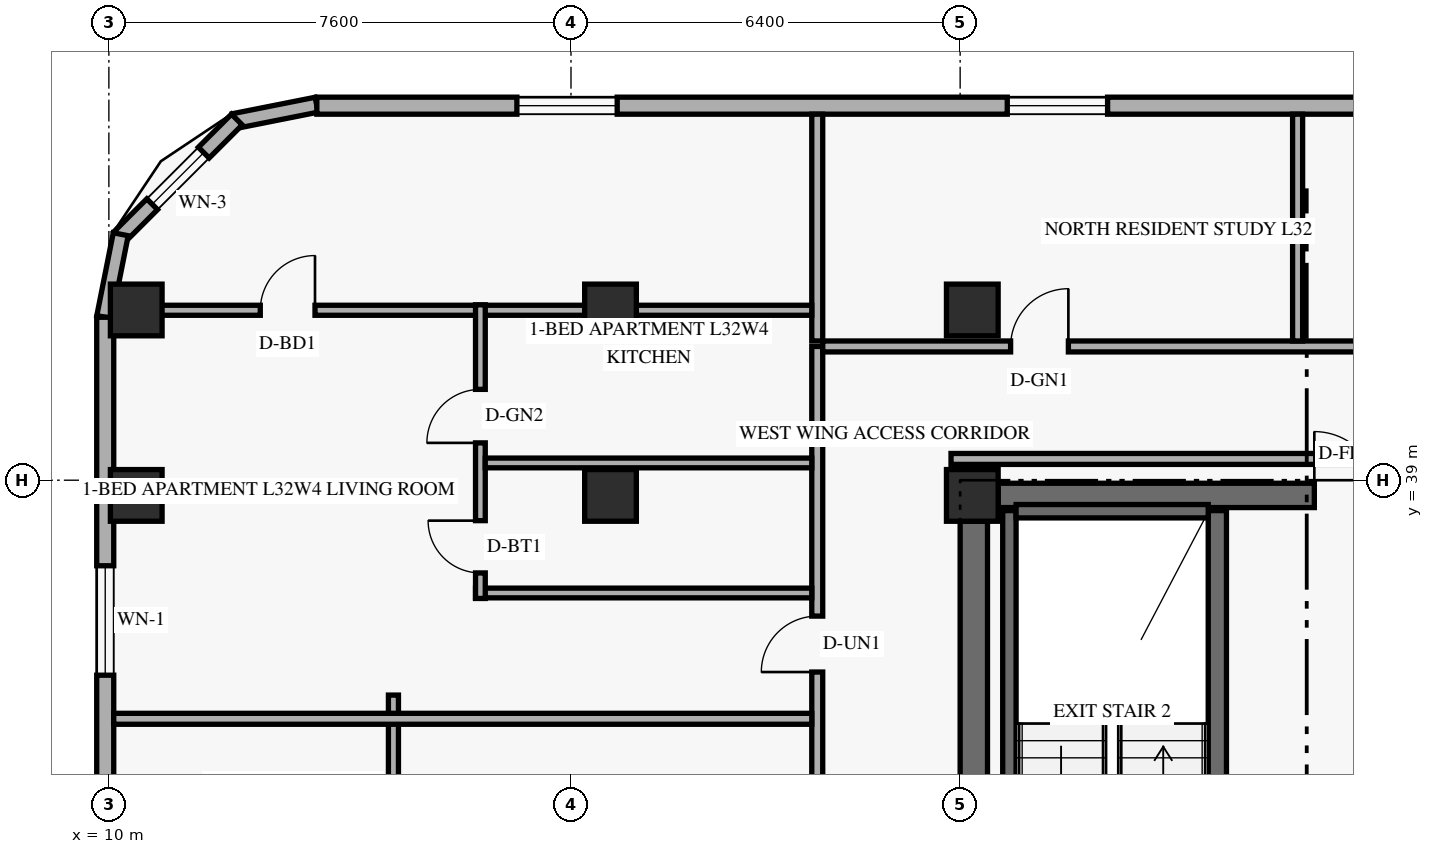
"""IFC4 building model, lengths in metres.
Left out: names, types, materials, properties, quantities, classifications, styles, units other than length and angle.
Written with IfcOpenShell. Run it as: python <this file> out.ifc"""

import sys

from ifc_helpers import new_model, si_unit, direction, frame, frame_2d, origin, origin_2d, place, context, subcontext, project, spatial, rectangle, extrude, element, fill, save


model = new_model("IFC4")
c1 = context("Model", 3, precision=1e-05, world=origin(), true_north=direction((0.0, 1.0)))
c2 = subcontext(c1, "Body", "Model", "MODEL_VIEW")
j1 = project(units=[si_unit("LENGTHUNIT", "METRE"), si_unit("PLANEANGLEUNIT", "RADIAN")], contexts=[c1])
p1 = place(None, origin())
s1 = spatial("IfcSite", under=j1, at=p1, CompositionType="ELEMENT")
p2 = place(p1, origin())
s2 = spatial("IfcBuilding", under=s1, at=p2, CompositionType="ELEMENT")
p3 = place(p2, frame((0.0, 0.0, 124.8)))
s3 = spatial("IfcBuildingStorey", under=s2, at=p3, CompositionType="ELEMENT", Elevation=124.8)
p4 = place(p3, frame((24.225, 30.625, 0.0), z_axis=(0.0, 0.0, 1.0), x_axis=(0.0, 1.0, 0.0)))
e1 = element("IfcWall", 1, at=p4, inside=s3, PredefinedType="SHEAR", context=c2, shape_type="SweptSolid", body=[
    extrude(rectangle(XDim=7.7, YDim=0.45, at=frame_2d((3.85, 0.0))), origin(), (0.0, 0.0, 1.0), 2.749),
])
p5 = place(p3, frame((24.625, 38.75, 0.0), z_axis=(0.0, 0.0, 1.0), x_axis=(1.0, 0.0, 0.0)))
e2 = element("IfcWall", 2, at=p5, inside=s3, PredefinedType="SHEAR", context=c2, shape_type="SweptSolid", body=[
    extrude(rectangle(XDim=10.15, YDim=0.4, at=frame_2d((5.075, 0.0))), origin(), (0.0, 0.0, 1.0), 3.36),
])
p6 = place(p5, frame((5.2, 0.0, 0.0)))
e3 = element("IfcOpeningElement", 3, at=p6, cuts=e2, PredefinedType="OPENING", context=c2, shape_type="SweptSolid", body=[
    extrude(rectangle(XDim=1.05, YDim=2.15, at=frame_2d((0.525, 1.075))), frame((0.0, 0.21, 0.0), z_axis=(0.0, -1.0, 0.0), x_axis=(1.0, 0.0, 0.0)), (0.0, 0.0, 1.0), 0.42),
])
p7 = place(p3, frame((24.81, 30.74, 0.0), z_axis=(0.0, 0.0, 1.0), x_axis=(0.0, 1.0, 0.0)))
e4 = element("IfcWall", 4, at=p7, inside=s3, PredefinedType="SHEAR", context=c2, shape_type="SweptSolid", body=[
    extrude(rectangle(XDim=7.76, YDim=0.22, at=frame_2d((3.88, 0.0))), origin(), (0.0, 0.0, 1.0), 3.36),
])
p8 = place(p3, frame((28.23, 30.74, 0.0), z_axis=(0.0, 0.0, 1.0), x_axis=(0.0, 1.0, 0.0)))
e5 = element("IfcWall", 5, at=p8, inside=s3, PredefinedType="SHEAR", context=c2, shape_type="SweptSolid", body=[
    extrude(rectangle(XDim=7.76, YDim=0.3, at=frame_2d((3.88, 0.0))), origin(), (0.0, 0.0, 1.0), 3.36),
])
p9 = place(p3, frame((24.92, 38.49, 0.0), z_axis=(0.0, 0.0, 1.0), x_axis=(1.0, 0.0, 0.0)))
e6 = element("IfcWall", 6, at=p9, inside=s3, PredefinedType="SHEAR", context=c2, shape_type="SweptSolid", body=[
    extrude(rectangle(XDim=3.16, YDim=0.22, at=frame_2d((1.58, 0.0))), origin(), (0.0, 0.0, 1.0), 3.36),
])
for number, where, z_axis, x_axis in (
    (7, (10.45, 38.75, 0.0), (0.0, 0.0, 1.0), (1.0, 0.0, 0.0)),
    (8, (10.45, 41.8, 0.0), (0.0, 0.0, 1.0), (1.0, 0.0, 0.0)),
    (9, (18.25, 38.75, 0.0), (0.0, 0.0, 1.0), (1.0, 0.0, 0.0)),
    (10, (18.25, 41.8, 0.0), (0.0, 0.0, 1.0), (1.0, 0.0, 0.0)),
    (11, (24.2, 38.75, 0.0), (0.0, 0.0, 1.0), (1.0, 0.0, 0.0)),
    (12, (24.2, 41.8, 0.0), (0.0, 0.0, 1.0), (1.0, 0.0, 0.0)),
):
    element("IfcColumn", number, at=place(p3, frame(where, z_axis=z_axis, x_axis=x_axis)), inside=s3, PredefinedType="COLUMN", context=c2, shape_type="SweptSolid", body=[
        extrude(rectangle(XDim=0.85, YDim=0.85, at=origin_2d()), origin(), (0.0, 0.0, 1.0), 3.6),
    ])
p10 = place(p3, frame((13.417, 45.176, 0.0), z_axis=(0.0, 0.0, 1.0), x_axis=(-0.980809899341, -0.19496651342, 0.0)))
e13 = element("IfcWall", 13, at=p10, inside=s3, PredefinedType="SOLIDWALL", context=c2, shape_type="SweptSolid", body=[
    extrude(rectangle(XDim=1.389, YDim=0.25, at=frame_2d((0.694, 0.0))), origin(), (0.0, 0.0, 1.0), 3.36),
])
p11 = place(p3, frame((12.105, 44.932, 0.0), z_axis=(0.0, 0.0, 1.0), x_axis=(-0.707151344399, -0.707062215165, 0.0)))
e14 = element("IfcWall", 14, at=p11, inside=s3, PredefinedType="SOLIDWALL", context=c2, shape_type="SweptSolid", body=[
    extrude(rectangle(XDim=2.739, YDim=0.25, at=frame_2d((1.37, 0.0))), origin(), (0.0, 0.0, 1.0), 3.36),
])
p12 = place(p11, frame((0.77, 0.0, 0.85)))
e15 = element("IfcOpeningElement", 15, at=p12, cuts=e14, PredefinedType="OPENING", context=c2, shape_type="SweptSolid", body=[
    extrude(rectangle(XDim=1.2, YDim=1.5, at=frame_2d((0.6, 0.75))), frame((0.0, 0.135, 0.0), z_axis=(0.0, -1.0, 0.0), x_axis=(1.0, 0.0, 0.0)), (0.0, 0.0, 1.0), 0.27),
])
p13 = place(p3, frame((10.195, 43.045, 0.0), z_axis=(0.0, 0.0, 1.0), x_axis=(-0.195000137217, -0.980803214965, 0.0)))
e16 = element("IfcWall", 16, at=p13, inside=s3, PredefinedType="SOLIDWALL", context=c2, shape_type="SweptSolid", body=[
    extrude(rectangle(XDim=1.388, YDim=0.25, at=frame_2d((0.694, 0.0))), origin(), (0.0, 0.0, 1.0), 3.36),
])
p14 = place(p3, frame((49.98, 45.16, 0.0), z_axis=(0.0, 0.0, 1.0), x_axis=(-1.0, 0.0, 0.0)))
e17 = element("IfcWall", 17, at=p14, inside=s3, PredefinedType="SOLIDWALL", context=c2, shape_type="SweptSolid", body=[
    extrude(rectangle(XDim=36.56, YDim=0.28, at=frame_2d((18.28, 0.0))), origin(), (0.0, 0.0, 1.0), 3.36),
])
p15 = place(p14, frame((31.62, 0.0, 0.85)))
e18 = element("IfcOpeningElement", 18, at=p15, cuts=e17, PredefinedType="OPENING", context=c2, shape_type="SweptSolid", body=[
    extrude(rectangle(XDim=1.65, YDim=1.6, at=frame_2d((0.825, 0.8))), frame((0.0, 0.15, 0.0), z_axis=(0.0, -1.0, 0.0), x_axis=(1.0, 0.0, 0.0)), (0.0, 0.0, 1.0), 0.3),
])
p16 = place(p14, frame((23.555, 0.0, 0.85)))
e19 = element("IfcOpeningElement", 19, at=p16, cuts=e17, PredefinedType="OPENING", context=c2, shape_type="SweptSolid", body=[
    extrude(rectangle(XDim=1.65, YDim=1.6, at=frame_2d((0.825, 0.8))), frame((0.0, 0.15, 0.0), z_axis=(0.0, -1.0, 0.0), x_axis=(1.0, 0.0, 0.0)), (0.0, 0.0, 1.0), 0.3),
])
p17 = place(p14, frame((16.67, 0.0, 0.85)))
e20 = element("IfcOpeningElement", 20, at=p17, cuts=e17, PredefinedType="OPENING", context=c2, shape_type="SweptSolid", body=[
    extrude(rectangle(XDim=1.65, YDim=1.6, at=frame_2d((0.825, 0.8))), frame((0.0, 0.15, 0.0), z_axis=(0.0, -1.0, 0.0), x_axis=(1.0, 0.0, 0.0)), (0.0, 0.0, 1.0), 0.3),
])
p18 = place(p14, frame((10.44, 0.0, 0.85)))
e21 = element("IfcOpeningElement", 21, at=p18, cuts=e17, PredefinedType="OPENING", context=c2, shape_type="SweptSolid", body=[
    extrude(rectangle(XDim=1.65, YDim=1.6, at=frame_2d((0.825, 0.8))), frame((0.0, 0.15, 0.0), z_axis=(0.0, -1.0, 0.0), x_axis=(1.0, 0.0, 0.0)), (0.0, 0.0, 1.0), 0.3),
])
p19 = place(p14, frame((4.65, 0.0, 0.85)))
e22 = element("IfcOpeningElement", 22, at=p19, cuts=e17, PredefinedType="OPENING", context=c2, shape_type="SweptSolid", body=[
    extrude(rectangle(XDim=1.65, YDim=1.6, at=frame_2d((0.825, 0.8))), frame((0.0, 0.15, 0.0), z_axis=(0.0, -1.0, 0.0), x_axis=(1.0, 0.0, 0.0)), (0.0, 0.0, 1.0), 0.3),
])
p20 = place(p14, frame((0.665, 0.0, 0.85)))
e23 = element("IfcOpeningElement", 23, at=p20, cuts=e17, PredefinedType="OPENING", context=c2, shape_type="SweptSolid", body=[
    extrude(rectangle(XDim=1.65, YDim=1.6, at=frame_2d((0.825, 0.8))), frame((0.0, 0.15, 0.0), z_axis=(0.0, -1.0, 0.0), x_axis=(1.0, 0.0, 0.0)), (0.0, 0.0, 1.0), 0.3),
])
p21 = place(p3, frame((9.94, 41.68, 0.0), z_axis=(0.0, 0.0, 1.0), x_axis=(0.0, -1.0, 0.0)))
e24 = element("IfcWall", 24, at=p21, inside=s3, PredefinedType="SOLIDWALL", context=c2, shape_type="SweptSolid", body=[
    extrude(rectangle(XDim=35.36, YDim=0.28, at=frame_2d((17.68, 0.0))), origin(), (0.0, 0.0, 1.0), 3.36),
])
p22 = place(p21, frame((29.473, 0.0, 0.85)))
e25 = element("IfcOpeningElement", 25, at=p22, cuts=e24, PredefinedType="OPENING", context=c2, shape_type="SweptSolid", body=[
    extrude(rectangle(XDim=1.8, YDim=1.6, at=frame_2d((0.9, 0.8))), frame((0.0, 0.15, 0.0), z_axis=(0.0, -1.0, 0.0), x_axis=(1.0, 0.0, 0.0)), (0.0, 0.0, 1.0), 0.3),
])
p23 = place(p21, frame((25.763, 0.0, 0.85)))
e26 = element("IfcOpeningElement", 26, at=p23, cuts=e24, PredefinedType="OPENING", context=c2, shape_type="SweptSolid", body=[
    extrude(rectangle(XDim=1.8, YDim=1.6, at=frame_2d((0.9, 0.8))), frame((0.0, 0.15, 0.0), z_axis=(0.0, -1.0, 0.0), x_axis=(1.0, 0.0, 0.0)), (0.0, 0.0, 1.0), 0.3),
])
p24 = place(p21, frame((18.732, 0.0, 0.85)))
e27 = element("IfcOpeningElement", 27, at=p24, cuts=e24, PredefinedType="OPENING", context=c2, shape_type="SweptSolid", body=[
    extrude(rectangle(XDim=1.8, YDim=1.6, at=frame_2d((0.9, 0.8))), frame((0.0, 0.15, 0.0), z_axis=(0.0, -1.0, 0.0), x_axis=(1.0, 0.0, 0.0)), (0.0, 0.0, 1.0), 0.3),
])
p25 = place(p21, frame((13.9, 0.0, 0.85)))
e28 = element("IfcOpeningElement", 28, at=p25, cuts=e24, PredefinedType="OPENING", context=c2, shape_type="SweptSolid", body=[
    extrude(rectangle(XDim=1.8, YDim=1.6, at=frame_2d((0.9, 0.8))), frame((0.0, 0.15, 0.0), z_axis=(0.0, -1.0, 0.0), x_axis=(1.0, 0.0, 0.0)), (0.0, 0.0, 1.0), 0.3),
])
p26 = place(p21, frame((7.656, 0.0, 0.85)))
e29 = element("IfcOpeningElement", 29, at=p26, cuts=e24, PredefinedType="OPENING", context=c2, shape_type="SweptSolid", body=[
    extrude(rectangle(XDim=1.8, YDim=1.6, at=frame_2d((0.9, 0.8))), frame((0.0, 0.15, 0.0), z_axis=(0.0, -1.0, 0.0), x_axis=(1.0, 0.0, 0.0)), (0.0, 0.0, 1.0), 0.3),
])
p27 = place(p21, frame((4.087, 0.0, 0.85)))
e30 = element("IfcOpeningElement", 30, at=p27, cuts=e24, PredefinedType="OPENING", context=c2, shape_type="SweptSolid", body=[
    extrude(rectangle(XDim=1.8, YDim=1.6, at=frame_2d((0.9, 0.8))), frame((0.0, 0.15, 0.0), z_axis=(0.0, -1.0, 0.0), x_axis=(1.0, 0.0, 0.0)), (0.0, 0.0, 1.0), 0.3),
])
p28 = place(p3, frame((21.65, 6.8, 0.0), z_axis=(0.0, 0.0, 1.0), x_axis=(0.0, 1.0, 0.0)))
e31 = element("IfcWall", 31, at=p28, inside=s3, PredefinedType="STANDARD", context=c2, shape_type="SweptSolid", body=[
    extrude(rectangle(XDim=34.4, YDim=0.18, at=frame_2d((17.2, 0.0))), origin(), (0.0, 0.0, 1.0), 2.731),
])
p29 = place(p28, frame((4.472, 0.0, 0.0)))
e32 = element("IfcOpeningElement", 32, at=p29, cuts=e31, PredefinedType="OPENING", context=c2, shape_type="SweptSolid", body=[
    extrude(rectangle(XDim=0.92, YDim=2.15, at=frame_2d((0.46, 1.075))), frame((0.0, 0.1, 0.0), z_axis=(0.0, -1.0, 0.0), x_axis=(1.0, 0.0, 0.0)), (0.0, 0.0, 1.0), 0.2),
])
p30 = place(p28, frame((7.261, 0.0, 0.0)))
e33 = element("IfcOpeningElement", 33, at=p30, cuts=e31, PredefinedType="OPENING", context=c2, shape_type="SweptSolid", body=[
    extrude(rectangle(XDim=0.92, YDim=2.15, at=frame_2d((0.46, 1.075))), frame((0.0, 0.1, 0.0), z_axis=(0.0, -1.0, 0.0), x_axis=(1.0, 0.0, 0.0)), (0.0, 0.0, 1.0), 0.2),
])
p31 = place(p28, frame((18.308, 0.0, 0.0)))
e34 = element("IfcOpeningElement", 34, at=p31, cuts=e31, PredefinedType="OPENING", context=c2, shape_type="SweptSolid", body=[
    extrude(rectangle(XDim=0.92, YDim=2.15, at=frame_2d((0.46, 1.075))), frame((0.0, 0.1, 0.0), z_axis=(0.0, -1.0, 0.0), x_axis=(1.0, 0.0, 0.0)), (0.0, 0.0, 1.0), 0.2),
])
p32 = place(p28, frame((29.045, 0.0, 0.0)))
e35 = element("IfcOpeningElement", 35, at=p32, cuts=e31, PredefinedType="OPENING", context=c2, shape_type="SweptSolid", body=[
    extrude(rectangle(XDim=0.92, YDim=2.15, at=frame_2d((0.46, 1.075))), frame((0.0, 0.1, 0.0), z_axis=(0.0, -1.0, 0.0), x_axis=(1.0, 0.0, 0.0)), (0.0, 0.0, 1.0), 0.2),
])
p33 = place(p3, frame((21.74, 41.2, 0.0), z_axis=(0.0, 0.0, 1.0), x_axis=(1.0, 0.0, 0.0)))
e36 = element("IfcWall", 36, at=p33, inside=s3, PredefinedType="STANDARD", context=c2, shape_type="SweptSolid", body=[
    extrude(rectangle(XDim=13.68, YDim=0.18, at=frame_2d((6.84, 0.0))), origin(), (0.0, 0.0, 1.0), 2.731),
])
p34 = place(p33, frame((3.09, 0.0, 0.0)))
e37 = element("IfcOpeningElement", 37, at=p34, cuts=e36, PredefinedType="OPENING", context=c2, shape_type="SweptSolid", body=[
    extrude(rectangle(XDim=0.95, YDim=2.15, at=frame_2d((0.475, 1.075))), frame((0.0, 0.1, 0.0), z_axis=(0.0, -1.0, 0.0), x_axis=(1.0, 0.0, 0.0)), (0.0, 0.0, 1.0), 0.2),
])
p35 = place(p33, frame((10.11, 0.0, 0.0)))
e38 = element("IfcOpeningElement", 38, at=p35, cuts=e36, PredefinedType="OPENING", context=c2, shape_type="SweptSolid", body=[
    extrude(rectangle(XDim=0.95, YDim=2.15, at=frame_2d((0.475, 1.075))), frame((0.0, 0.1, 0.0), z_axis=(0.0, -1.0, 0.0), x_axis=(1.0, 0.0, 0.0)), (0.0, 0.0, 1.0), 0.2),
])
p36 = place(p3, frame((23.85, 39.35, 0.0), z_axis=(0.0, 0.0, 1.0), x_axis=(1.0, 0.0, 0.0)))
e39 = element("IfcWall", 39, at=p36, inside=s3, PredefinedType="STANDARD", context=c2, shape_type="SweptSolid", body=[
    extrude(rectangle(XDim=11.57, YDim=0.18, at=frame_2d((5.785, 0.0))), origin(), (0.0, 0.0, 1.0), 2.731),
])
p37 = place(p3, frame((21.65, 41.29, 0.0), z_axis=(0.0, 0.0, 1.0), x_axis=(0.0, 1.0, 0.0)))
e40 = element("IfcWall", 40, at=p37, inside=s3, PredefinedType="PARTITIONING", context=c2, shape_type="SweptSolid", body=[
    extrude(rectangle(XDim=3.73, YDim=0.18, at=frame_2d((1.865, 0.0))), origin(), (0.0, 0.0, 1.0), 2.809),
])
p38 = place(p3, frame((14.68, 31.092, 0.0), z_axis=(0.0, 0.0, 1.0), x_axis=(0.0, 1.0, 0.0)))
e41 = element("IfcWall", 41, at=p38, inside=s3, PredefinedType="PARTITIONING", context=c2, shape_type="SweptSolid", body=[
    extrude(rectangle(XDim=4.374, YDim=0.165, at=frame_2d((2.187, 0.0))), origin(), (0.0, 0.0, 1.0), 2.988),
])
p39 = place(p3, frame((10.08, 35.076, 0.0), z_axis=(0.0, 0.0, 1.0), x_axis=(1.0, 0.0, 0.0)))
e42 = element("IfcWall", 42, at=p39, inside=s3, PredefinedType="PARTITIONING", context=c2, shape_type="SweptSolid", body=[
    extrude(rectangle(XDim=11.48, YDim=0.18, at=frame_2d((5.74, 0.0))), origin(), (0.0, 0.0, 1.0), 2.731),
])
p40 = place(p3, frame((10.099, 41.795, 0.0), z_axis=(0.0, 0.0, 1.0), x_axis=(1.0, 0.0, 0.0)))
e43 = element("IfcWall", 43, at=p40, inside=s3, PredefinedType="PARTITIONING", context=c2, shape_type="SweptSolid", body=[
    extrude(rectangle(XDim=11.461, YDim=0.165, at=frame_2d((5.73, 0.0))), origin(), (0.0, 0.0, 1.0), 2.809),
])
p41 = place(p40, frame((2.391, 0.0, 0.0)))
e44 = element("IfcOpeningElement", 44, at=p41, cuts=e43, PredefinedType="OPENING", context=c2, shape_type="SweptSolid", body=[
    extrude(rectangle(XDim=0.9, YDim=2.14, at=frame_2d((0.45, 1.07))), frame((0.0, 0.093, 0.0), z_axis=(0.0, -1.0, 0.0), x_axis=(1.0, 0.0, 0.0)), (0.0, 0.0, 1.0), 0.185),
])
p42 = place(p3, frame((16.03, 37.145, 0.0), z_axis=(0.0, 0.0, 1.0), x_axis=(1.0, 0.0, 0.0)))
e45 = element("IfcWall", 45, at=p42, inside=s3, PredefinedType="PLUMBINGWALL", context=c2, shape_type="SweptSolid", body=[
    extrude(rectangle(XDim=5.53, YDim=0.16, at=frame_2d((2.765, 0.0))), origin(), (0.0, 0.0, 1.0), 2.731),
])
p43 = place(p3, frame((16.11, 37.055, 0.0), z_axis=(0.0, 0.0, 1.0), x_axis=(0.0, 1.0, 0.0)))
e46 = element("IfcWall", 46, at=p43, inside=s3, PredefinedType="PLUMBINGWALL", context=c2, shape_type="SweptSolid", body=[
    extrude(rectangle(XDim=4.83, YDim=0.16, at=frame_2d((2.415, 0.0))), origin(), (0.0, 0.0, 1.0), 2.731),
])
p44 = place(p43, frame((0.42, 0.0, 0.0)))
e47 = element("IfcOpeningElement", 47, at=p44, cuts=e46, PredefinedType="OPENING", context=c2, shape_type="SweptSolid", body=[
    extrude(rectangle(XDim=0.86, YDim=2.12, at=frame_2d((0.43, 1.06))), frame((0.0, 0.09, 0.0), z_axis=(0.0, -1.0, 0.0), x_axis=(1.0, 0.0, 0.0)), (0.0, 0.0, 1.0), 0.18),
])
p45 = place(p43, frame((2.559, 0.0, 0.0)))
e48 = element("IfcOpeningElement", 48, at=p45, cuts=e46, PredefinedType="OPENING", context=c2, shape_type="SweptSolid", body=[
    extrude(rectangle(XDim=0.88, YDim=2.12, at=frame_2d((0.44, 1.06))), frame((0.0, 0.09, 0.0), z_axis=(0.0, -1.0, 0.0), x_axis=(1.0, 0.0, 0.0)), (0.0, 0.0, 1.0), 0.18),
])
p46 = place(p3, frame((16.19, 39.284, 0.0), z_axis=(0.0, 0.0, 1.0), x_axis=(1.0, 0.0, 0.0)))
e49 = element("IfcWall", 49, at=p46, inside=s3, PredefinedType="PLUMBINGWALL", context=c2, shape_type="SweptSolid", body=[
    extrude(rectangle(XDim=5.37, YDim=0.16, at=frame_2d((2.685, 0.0))), origin(), (0.0, 0.0, 1.0), 2.731),
])
p47 = place(p3, frame((29.55, 41.29, 0.0), z_axis=(0.0, 0.0, 1.0), x_axis=(0.0, 1.0, 0.0)))
e50 = element("IfcWall", 50, at=p47, inside=s3, PredefinedType="PARTITIONING", context=c2, shape_type="SweptSolid", body=[
    extrude(rectangle(XDim=3.73, YDim=0.165, at=frame_2d((1.865, 0.0))), origin(), (0.0, 0.0, 1.0), 2.809),
])
p48 = place(p12, origin())
e51 = element("IfcWindow", 51, at=p48, inside=s3, PartitioningType="SINGLE_PANEL", PredefinedType="WINDOW", context=c2, shape_type="SweptSolid", body=[
    extrude(rectangle(XDim=1.2, YDim=1.5, at=frame_2d((0.6, 0.75))), frame((0.0, 0.03, 0.0), z_axis=(0.0, -1.0, 0.0), x_axis=(1.0, 0.0, 0.0)), (0.0, 0.0, 1.0), 0.06),
])
fill(e15, e51)
p49 = place(p15, origin())
e52 = element("IfcWindow", 52, at=p49, inside=s3, PartitioningType="SINGLE_PANEL", PredefinedType="WINDOW", context=c2, shape_type="SweptSolid", body=[
    extrude(rectangle(XDim=1.65, YDim=1.6, at=frame_2d((0.825, 0.8))), frame((0.0, 0.03, 0.0), z_axis=(0.0, -1.0, 0.0), x_axis=(1.0, 0.0, 0.0)), (0.0, 0.0, 1.0), 0.06),
])
fill(e18, e52)
p50 = place(p16, origin())
e53 = element("IfcWindow", 53, at=p50, inside=s3, PartitioningType="SINGLE_PANEL", PredefinedType="WINDOW", context=c2, shape_type="SweptSolid", body=[
    extrude(rectangle(XDim=1.65, YDim=1.6, at=frame_2d((0.825, 0.8))), frame((0.0, 0.03, 0.0), z_axis=(0.0, -1.0, 0.0), x_axis=(1.0, 0.0, 0.0)), (0.0, 0.0, 1.0), 0.06),
])
fill(e19, e53)
p51 = place(p27, origin())
e54 = element("IfcWindow", 54, at=p51, inside=s3, PartitioningType="SINGLE_PANEL", PredefinedType="WINDOW", context=c2, shape_type="SweptSolid", body=[
    extrude(rectangle(XDim=1.8, YDim=1.6, at=frame_2d((0.9, 0.8))), frame((0.0, 0.03, 0.0), z_axis=(0.0, -1.0, 0.0), x_axis=(1.0, 0.0, 0.0)), (0.0, 0.0, 1.0), 0.06),
])
fill(e30, e54)
p52 = place(p6, frame((1.05, 0.0, 0.0), z_axis=(0.0, 0.0, 1.0), x_axis=(-1.0, 0.0, 0.0)))
e55 = element("IfcDoor", 55, at=p52, inside=s3, OperationType="SINGLE_SWING_RIGHT", PredefinedType="DOOR", context=c2, shape_type="SweptSolid", body=[
    extrude(rectangle(XDim=1.05, YDim=2.15, at=frame_2d((0.525, 1.075))), frame((0.0, 0.025, 0.0), z_axis=(0.0, -1.0, 0.0), x_axis=(1.0, 0.0, 0.0)), (0.0, 0.0, 1.0), 0.05),
])
fill(e3, e55)
p53 = place(p32, origin())
e56 = element("IfcDoor", 56, at=p53, inside=s3, OperationType="SINGLE_SWING_LEFT", PredefinedType="DOOR", context=c2, shape_type="SweptSolid", body=[
    extrude(rectangle(XDim=0.92, YDim=2.15, at=frame_2d((0.46, 1.075))), frame((0.0, 0.025, 0.0), z_axis=(0.0, -1.0, 0.0), x_axis=(1.0, 0.0, 0.0)), (0.0, 0.0, 1.0), 0.05),
])
fill(e35, e56)
p54 = place(p44, origin())
e57 = element("IfcDoor", 57, at=p54, inside=s3, OperationType="SINGLE_SWING_RIGHT", PredefinedType="DOOR", context=c2, shape_type="SweptSolid", body=[
    extrude(rectangle(XDim=0.86, YDim=2.12, at=frame_2d((0.43, 1.06))), frame((0.0, 0.025, 0.0), z_axis=(0.0, -1.0, 0.0), x_axis=(1.0, 0.0, 0.0)), (0.0, 0.0, 1.0), 0.05),
])
fill(e47, e57)
p55 = place(p45, origin())
e58 = element("IfcDoor", 58, at=p55, inside=s3, OperationType="SINGLE_SWING_LEFT", PredefinedType="DOOR", context=c2, shape_type="SweptSolid", body=[
    extrude(rectangle(XDim=0.88, YDim=2.12, at=frame_2d((0.44, 1.06))), frame((0.0, 0.025, 0.0), z_axis=(0.0, -1.0, 0.0), x_axis=(1.0, 0.0, 0.0)), (0.0, 0.0, 1.0), 0.05),
])
fill(e48, e58)
p56 = place(p41, origin())
e59 = element("IfcDoor", 59, at=p56, inside=s3, OperationType="SINGLE_SWING_RIGHT", PredefinedType="DOOR", context=c2, shape_type="SweptSolid", body=[
    extrude(rectangle(XDim=0.9, YDim=2.14, at=frame_2d((0.45, 1.07))), frame((0.0, 0.025, 0.0), z_axis=(0.0, -1.0, 0.0), x_axis=(1.0, 0.0, 0.0)), (0.0, 0.0, 1.0), 0.05),
])
fill(e44, e59)
p57 = place(p34, origin())
e60 = element("IfcDoor", 60, at=p57, inside=s3, OperationType="SINGLE_SWING_RIGHT", PredefinedType="DOOR", context=c2, shape_type="SweptSolid", body=[
    extrude(rectangle(XDim=0.95, YDim=2.15, at=frame_2d((0.475, 1.075))), frame((0.0, 0.025, 0.0), z_axis=(0.0, -1.0, 0.0), x_axis=(1.0, 0.0, 0.0)), (0.0, 0.0, 1.0), 0.05),
])
fill(e37, e60)
save(model, sys.argv[1])
